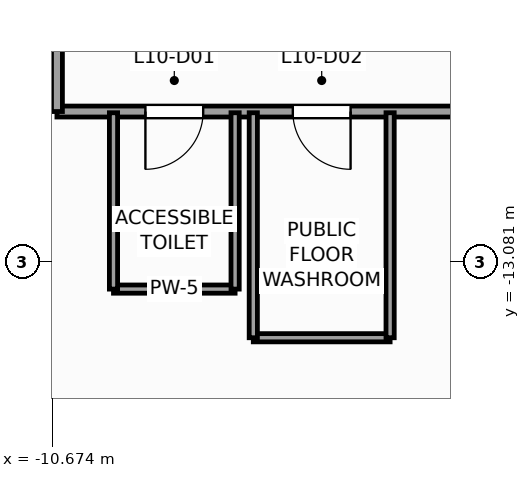
"""IFC4 building model, lengths in metres.
Left out: names, types, materials, properties, quantities, classifications, styles, units other than length and angle.
Written with IfcOpenShell. Run it as: python <this file> out.ifc"""

import sys

from ifc_helpers import new_model, si_unit, direction, frame, frame_2d, origin, place, context, subcontext, project, spatial, rectangle, extrude, source, transform, mapped, element, fill, save


model = new_model("IFC4")
c1 = context("Model", 3, precision=1e-05, world=origin(), true_north=direction((0.0, 1.0)))
c2 = subcontext(c1, "Body", "Model", "MODEL_VIEW")
j1 = project(units=[si_unit("LENGTHUNIT", "METRE"), si_unit("PLANEANGLEUNIT", "RADIAN")], contexts=[c1])
p1 = place(None, origin())
s1 = spatial("IfcSite", under=j1, at=p1, CompositionType="ELEMENT")
p2 = place(p1, origin())
s2 = spatial("IfcBuilding", under=s1, at=p2, CompositionType="ELEMENT")
p3 = place(p2, frame((0.0, 0.0, 46.0)))
s3 = spatial("IfcBuildingStorey", under=s2, at=p3, CompositionType="ELEMENT", Elevation=46.0)
p4 = place(p3, frame((-10.6, -10.6, 0.0), z_axis=(0.0, 0.0, 1.0), x_axis=(1.0, 0.0, 0.0)))
e1 = element("IfcWall", 1, at=p4, inside=s3, PredefinedType="PARTITIONING", context=c2, shape_type="SweptSolid", body=[
    extrude(rectangle(XDim=7.35, YDim=0.18, at=frame_2d((3.675, 0.0))), origin(), (0.0, 0.0, 1.0), 3.72),
])
p5 = place(p4, frame((1.455, 0.0, 0.0)))
e2 = element("IfcOpeningElement", 2, at=p5, cuts=e1, PredefinedType="OPENING", context=c2, shape_type="SweptSolid", body=[
    extrude(rectangle(XDim=0.95, YDim=2.1, at=frame_2d((0.475, 1.05))), frame((0.0, 0.1, 0.0), z_axis=(0.0, -1.0, 0.0), x_axis=(1.0, 0.0, 0.0)), (0.0, 0.0, 1.0), 0.2),
])
p6 = place(p4, frame((3.879, 0.0, 0.0)))
e3 = element("IfcOpeningElement", 3, at=p6, cuts=e1, PredefinedType="OPENING", context=c2, shape_type="SweptSolid", body=[
    extrude(rectangle(XDim=0.95, YDim=2.1, at=frame_2d((0.475, 1.05))), frame((0.0, 0.1, 0.0), z_axis=(0.0, -1.0, 0.0), x_axis=(1.0, 0.0, 0.0)), (0.0, 0.0, 1.0), 0.2),
])
p7 = place(p3, frame((-10.6, -10.6, 0.0), z_axis=(0.0, 0.0, 1.0), x_axis=(0.0, 1.0, 0.0)))
e4 = element("IfcWall", 4, at=p7, inside=s3, PredefinedType="PARTITIONING", context=c2, shape_type="SweptSolid", body=[
    extrude(rectangle(XDim=11.55, YDim=0.18, at=frame_2d((5.775, 0.0))), origin(), (0.0, 0.0, 1.0), 3.72),
])
p8 = place(p3, frame((-9.67, -13.52, 0.0), z_axis=(0.0, 0.0, 1.0), x_axis=(1.0, 0.0, 0.0)))
e5 = element("IfcWall", 5, at=p8, inside=s3, PredefinedType="PARTITIONING", context=c2, shape_type="SweptSolid", body=[
    extrude(rectangle(XDim=2.0, YDim=0.135, at=frame_2d((1.0, 0.0))), origin(), (0.0, 0.0, 1.0), 3.72),
])
for number, where, z_axis, x_axis in (
    (6, (-7.67, -13.52, 0.0), (0.0, 0.0, 1.0), (0.0, 1.0, 0.0)),
    (7, (-9.67, -13.52, 0.0), (0.0, 0.0, 1.0), (0.0, 1.0, 0.0)),
):
    element("IfcWall", number, at=place(p3, frame(where, z_axis=z_axis, x_axis=x_axis)), inside=s3, PredefinedType="PARTITIONING", context=c2, shape_type="SweptSolid", body=[
        extrude(rectangle(XDim=2.9, YDim=0.135, at=frame_2d((1.45, 0.0))), origin(), (0.0, 0.0, 1.0), 3.72),
    ])
p9 = place(p3, frame((-7.371, -14.32, 0.0), z_axis=(0.0, 0.0, 1.0), x_axis=(1.0, 0.0, 0.0)))
e8 = element("IfcWall", 8, at=p9, inside=s3, PredefinedType="PARTITIONING", context=c2, shape_type="SweptSolid", body=[
    extrude(rectangle(XDim=2.25, YDim=0.135, at=frame_2d((1.125, 0.0))), origin(), (0.0, 0.0, 1.0), 3.72),
])
for number, where, z_axis, x_axis in (
    (9, (-5.121, -14.32, 0.0), (0.0, 0.0, 1.0), (0.0, 1.0, 0.0)),
    (10, (-7.371, -14.32, 0.0), (0.0, 0.0, 1.0), (0.0, 1.0, 0.0)),
):
    element("IfcWall", number, at=place(p3, frame(where, z_axis=z_axis, x_axis=x_axis)), inside=s3, PredefinedType="PARTITIONING", context=c2, shape_type="SweptSolid", body=[
        extrude(rectangle(XDim=3.7, YDim=0.135, at=frame_2d((1.85, 0.0))), origin(), (0.0, 0.0, 1.0), 3.72),
    ])
m1 = source(origin(), c2, "Body", "SweptSolid", [
    extrude(rectangle(XDim=0.95, YDim=2.1, at=frame_2d((0.475, 1.05))), frame((0.0, 0.025, 0.0), z_axis=(0.0, -1.0, 0.0), x_axis=(1.0, 0.0, 0.0)), (0.0, 0.0, 1.0), 0.05),
])
p10 = place(p5, frame((0.95, 0.0, 0.0), z_axis=(0.0, 0.0, 1.0), x_axis=(-1.0, 0.0, 0.0)))
e11 = element("IfcDoor", 11, at=p10, inside=s3, OperationType="SINGLE_SWING_LEFT", PredefinedType="DOOR", context=c2, shape_type="MappedRepresentation", body=[
    mapped(m1, transform((0.0, 0.0, 0.0), scale=1.0)),
])
fill(e2, e11)
p11 = place(p6, frame((0.95, 0.0, 0.0), z_axis=(0.0, 0.0, 1.0), x_axis=(-1.0, 0.0, 0.0)))
e12 = element("IfcDoor", 12, at=p11, inside=s3, OperationType="SINGLE_SWING_RIGHT", PredefinedType="DOOR", context=c2, shape_type="MappedRepresentation", body=[
    mapped(m1, transform((0.0, 0.0, 0.0), scale=1.0)),
])
fill(e3, e12)
save(model, sys.argv[1])
